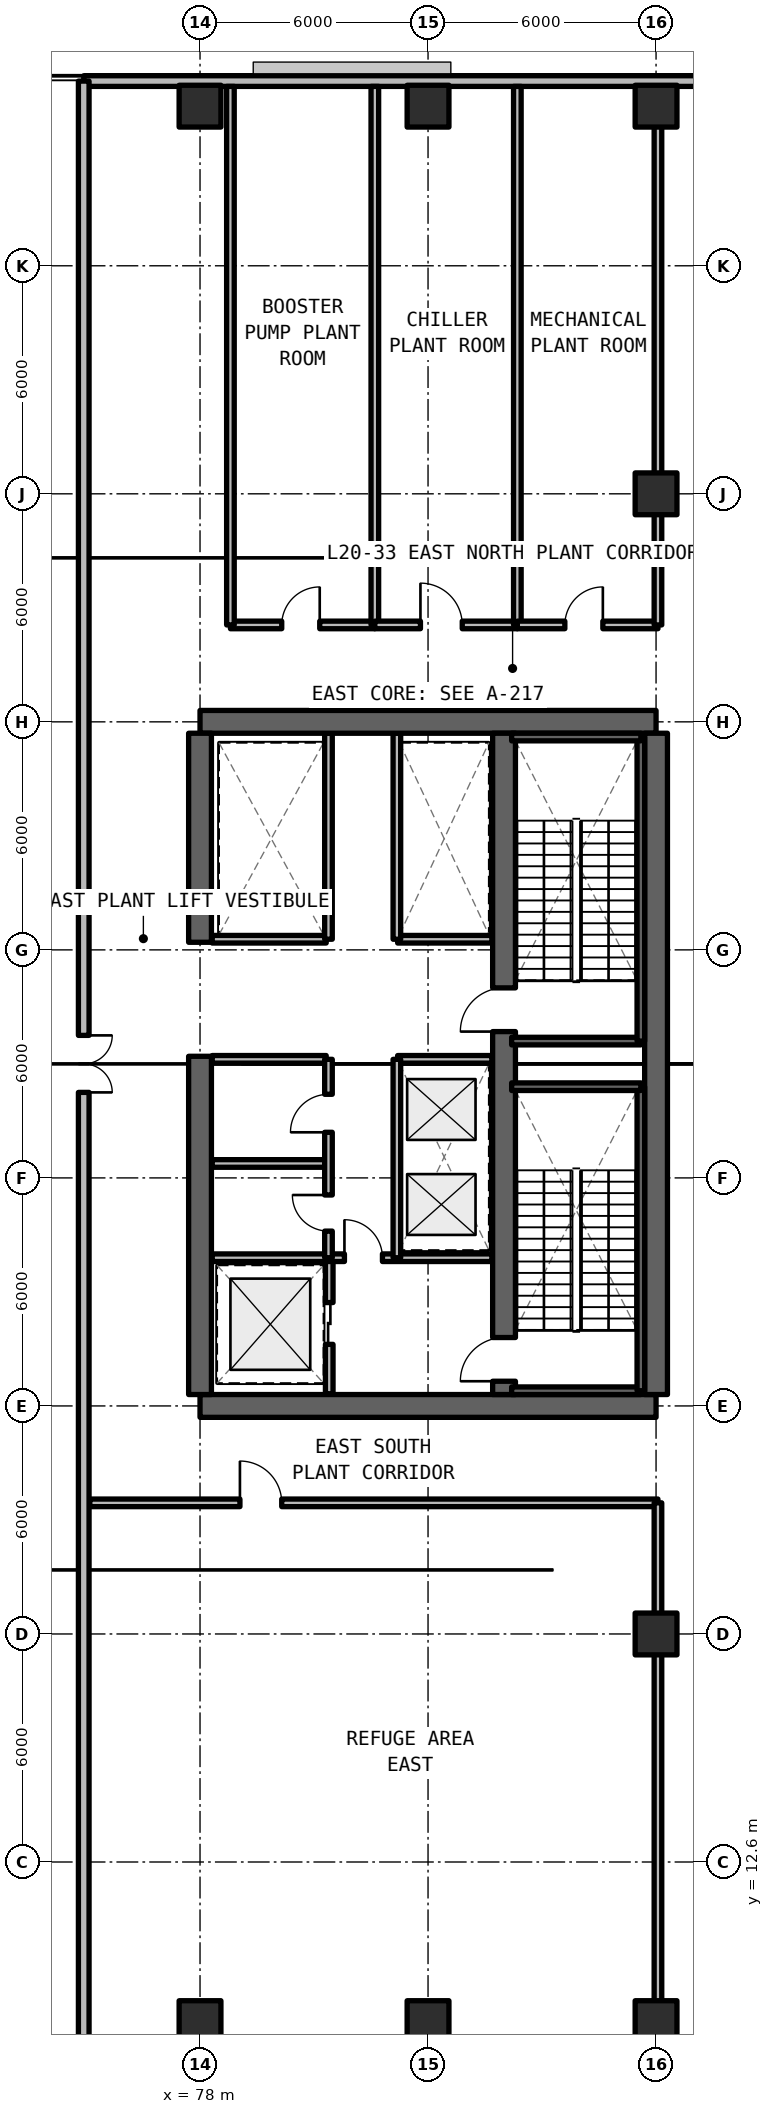
"""IFC4 building model, lengths in metres.
Left out: names, types, materials, properties, quantities, classifications, styles, units other than length and angle.
Written with IfcOpenShell. Run it as: python <this file> out.ifc"""

import sys

from ifc_helpers import new_model, si_unit, direction, frame, frame_2d, origin, origin_2d, place, context, subcontext, project, spatial, rectangle, extrude, element, fill, save


model = new_model("IFC4")
c1 = context("Model", 3, precision=1e-05, world=origin(), true_north=direction((0.0, 1.0)))
c2 = subcontext(c1, "Body", "Model", "MODEL_VIEW")
j1 = project(units=[si_unit("LENGTHUNIT", "METRE"), si_unit("PLANEANGLEUNIT", "RADIAN")], contexts=[c1])
p1 = place(None, origin())
s1 = spatial("IfcSite", under=j1, at=p1, CompositionType="ELEMENT")
p2 = place(p1, origin())
s2 = spatial("IfcBuilding", under=s1, at=p2, CompositionType="ELEMENT")
p3 = place(p2, frame((0.0, 0.0, 73.26)))
s3 = spatial("IfcBuildingStorey", under=s2, at=p3, CompositionType="ELEMENT", Elevation=73.26)
for number, where, z_axis, x_axis in (
    (1, (78.0, 24.6, 0.0), (0.0, 0.0, 1.0), (1.0, 0.0, 0.0)),
    (2, (90.0, 42.6, 0.0), (0.0, 0.0, 1.0), (-1.0, 0.0, 0.0)),
):
    element("IfcWall", number, at=place(p3, frame(where, z_axis=z_axis, x_axis=x_axis)), inside=s3, PredefinedType="SHEAR", context=c2, shape_type="SweptSolid", body=[
        extrude(rectangle(XDim=12.0, YDim=0.6, at=frame_2d((6.0, 0.0))), origin(), (0.0, 0.0, 1.0), 4.95),
    ])
p4 = place(p3, frame((90.0, 24.9, 0.0), z_axis=(0.0, 0.0, 1.0), x_axis=(0.0, 1.0, 0.0)))
e3 = element("IfcWall", 3, at=p4, inside=s3, PredefinedType="SHEAR", context=c2, shape_type="SweptSolid", body=[
    extrude(rectangle(XDim=17.4, YDim=0.6, at=frame_2d((8.7, 0.0))), origin(), (0.0, 0.0, 1.0), 4.95),
])
p5 = place(p3, frame((78.0, 24.9, 0.0), z_axis=(0.0, 0.0, 1.0), x_axis=(0.0, 1.0, 0.0)))
e4 = element("IfcWall", 4, at=p5, inside=s3, PredefinedType="SHEAR", context=c2, shape_type="SweptSolid", body=[
    extrude(rectangle(XDim=8.9, YDim=0.6, at=frame_2d((4.45, 0.0))), origin(), (0.0, 0.0, 1.0), 4.95),
])
p6 = place(p3, frame((78.0, 36.8, 0.0), z_axis=(0.0, 0.0, 1.0), x_axis=(0.0, 1.0, 0.0)))
e5 = element("IfcWall", 5, at=p6, inside=s3, PredefinedType="SHEAR", context=c2, shape_type="SweptSolid", body=[
    extrude(rectangle(XDim=5.5, YDim=0.6, at=frame_2d((2.75, 0.0))), origin(), (0.0, 0.0, 1.0), 4.95),
])
p7 = place(p3, frame((86.0, 24.9, 0.0), z_axis=(0.0, 0.0, 1.0), x_axis=(0.0, 1.0, 0.0)))
e6 = element("IfcWall", 6, at=p7, inside=s3, PredefinedType="SHEAR", context=c2, shape_type="SweptSolid", body=[
    extrude(rectangle(XDim=17.4, YDim=0.6, at=frame_2d((8.7, 0.0))), origin(), (0.0, 0.0, 1.0), 4.95),
])
p8 = place(p7, frame((0.35, 0.0, 0.0)))
e7 = element("IfcOpeningElement", 7, at=p8, cuts=e6, PredefinedType="OPENING", context=c2, shape_type="SweptSolid", body=[
    extrude(rectangle(XDim=1.15, YDim=2.15, at=frame_2d((0.575, 1.075))), frame((0.0, 0.31, 0.0), z_axis=(0.0, -1.0, 0.0), x_axis=(1.0, 0.0, 0.0)), (0.0, 0.0, 1.0), 0.62),
])
p9 = place(p7, frame((9.55, 0.0, 0.0)))
e8 = element("IfcOpeningElement", 8, at=p9, cuts=e6, PredefinedType="OPENING", context=c2, shape_type="SweptSolid", body=[
    extrude(rectangle(XDim=1.15, YDim=2.15, at=frame_2d((0.575, 1.075))), frame((0.0, 0.31, 0.0), z_axis=(0.0, -1.0, 0.0), x_axis=(1.0, 0.0, 0.0)), (0.0, 0.0, 1.0), 0.62),
])
for number, where, z_axis, x_axis in (
    (9, (90.0, 18.6, 0.0), (0.0, 0.0, 1.0), (1.0, 0.0, 0.0)),
    (10, (90.0, 48.6, 0.0), (0.0, 0.0, 1.0), (1.0, 0.0, 0.0)),
):
    element("IfcColumn", number, at=place(p3, frame(where, z_axis=z_axis, x_axis=x_axis)), inside=s3, PredefinedType="COLUMN", context=c2, shape_type="SweptSolid", body=[
        extrude(rectangle(XDim=1.1, YDim=1.1, at=origin_2d()), origin(), (0.0, 0.0, 1.0), 4.95),
    ])
for number, where, z_axis, x_axis in (
    (11, (78.0, 8.4, 0.0), (0.0, 0.0, 1.0), (1.0, 0.0, 0.0)),
    (12, (78.0, 58.8, 0.0), (0.0, 0.0, 1.0), (1.0, 0.0, 0.0)),
    (13, (84.0, 8.4, 0.0), (0.0, 0.0, 1.0), (1.0, 0.0, 0.0)),
    (14, (84.0, 58.8, 0.0), (0.0, 0.0, 1.0), (1.0, 0.0, 0.0)),
    (15, (90.0, 8.4, 0.0), (0.0, 0.0, 1.0), (1.0, 0.0, 0.0)),
    (16, (90.0, 58.8, 0.0), (0.0, 0.0, 1.0), (1.0, 0.0, 0.0)),
):
    element("IfcColumn", number, at=place(p3, frame(where, z_axis=z_axis, x_axis=x_axis)), inside=s3, PredefinedType="COLUMN", context=c2, shape_type="SweptSolid", body=[
        extrude(rectangle(XDim=1.1, YDim=1.1, at=origin_2d()), origin(), (0.0, 0.0, 1.0), 4.67),
    ])
p10 = place(p3, frame((96.542, 59.46, 0.0), z_axis=(0.0, 0.0, 1.0), x_axis=(-1.0, 0.0, 0.0)))
e17 = element("IfcWall", 17, at=p10, inside=s3, PredefinedType="SOLIDWALL", context=c2, shape_type="SweptSolid", body=[
    extrude(rectangle(XDim=21.602, YDim=0.28, at=frame_2d((10.801, 0.0))), origin(), (0.0, 0.0, 1.0), 4.67),
])
p11 = place(p3, frame((74.94, 59.46, 0.0), z_axis=(0.0, 0.0, 1.0), x_axis=(0.0, -1.0, 0.0)))
e18 = element("IfcWall", 18, at=p11, inside=s3, PredefinedType="SOLIDWALL", context=c2, shape_type="SweptSolid", body=[
    extrude(rectangle(XDim=51.72, YDim=0.28, at=frame_2d((25.86, 0.0))), origin(), (0.0, 0.0, 1.0), 4.246),
])
p12 = place(p11, frame((25.11, 0.0, 0.0)))
e19 = element("IfcOpeningElement", 19, at=p12, cuts=e18, PredefinedType="OPENING", context=c2, shape_type="SweptSolid", body=[
    extrude(rectangle(XDim=1.5, YDim=2.2, at=frame_2d((0.75, 1.1))), frame((0.0, 0.15, 0.0), z_axis=(0.0, -1.0, 0.0), x_axis=(1.0, 0.0, 0.0)), (0.0, 0.0, 1.0), 0.3),
])
p13 = place(p3, frame((81.4, 24.92, 0.0), z_axis=(0.0, 0.0, 1.0), x_axis=(0.0, 1.0, 0.0)))
e20 = element("IfcWall", 20, at=p13, inside=s3, PredefinedType="SOLIDWALL", context=c2, shape_type="SweptSolid", body=[
    extrude(rectangle(XDim=3.58, YDim=0.2, at=frame_2d((1.79, 0.0))), origin(), (0.0, 0.0, 1.0), 3.89),
])
p14 = place(p13, frame((1.3, 0.0, 0.0)))
e21 = element("IfcOpeningElement", 21, at=p14, cuts=e20, PredefinedType="OPENING", context=c2, shape_type="SweptSolid", body=[
    extrude(rectangle(XDim=1.1, YDim=2.2, at=frame_2d((0.55, 1.1))), frame((0.0, 0.11, 0.0), z_axis=(0.0, -1.0, 0.0), x_axis=(1.0, 0.0, 0.0)), (0.0, 0.0, 1.0), 0.22),
])
p15 = place(p3, frame((78.32, 28.5, 0.0), z_axis=(0.0, 0.0, 1.0), x_axis=(1.0, 0.0, 0.0)))
e22 = element("IfcWall", 22, at=p15, inside=s3, PredefinedType="SOLIDWALL", context=c2, shape_type="SweptSolid", body=[
    extrude(rectangle(XDim=7.36, YDim=0.2, at=frame_2d((3.68, 0.0))), origin(), (0.0, 0.0, 1.0), 3.89),
])
p16 = place(p15, frame((3.48, 0.0, 0.0)))
e23 = element("IfcOpeningElement", 23, at=p16, cuts=e22, PredefinedType="OPENING", context=c2, shape_type="SweptSolid", body=[
    extrude(rectangle(XDim=1.0, YDim=2.15, at=frame_2d((0.5, 1.075))), frame((0.0, 0.11, 0.0), z_axis=(0.0, -1.0, 0.0), x_axis=(1.0, 0.0, 0.0)), (0.0, 0.0, 1.0), 0.22),
])
p17 = place(p3, frame((83.2, 33.72, 0.0), z_axis=(0.0, 0.0, 1.0), x_axis=(1.0, 0.0, 0.0)))
e24 = element("IfcWall", 24, at=p17, inside=s3, PredefinedType="SOLIDWALL", context=c2, shape_type="SweptSolid", body=[
    extrude(rectangle(XDim=2.48, YDim=0.2, at=frame_2d((1.24, 0.0))), origin(), (0.0, 0.0, 1.0), 3.89),
])
p18 = place(p3, frame((83.18, 28.5, 0.0), z_axis=(0.0, 0.0, 1.0), x_axis=(0.0, 1.0, 0.0)))
e25 = element("IfcWall", 25, at=p18, inside=s3, PredefinedType="SOLIDWALL", context=c2, shape_type="SweptSolid", body=[
    extrude(rectangle(XDim=5.22, YDim=0.2, at=frame_2d((2.61, 0.0))), origin(), (0.0, 0.0, 1.0), 3.89),
])
for number, where, z_axis, x_axis in (
    (26, (78.32, 30.98, 0.0), (0.0, 0.0, 1.0), (1.0, 0.0, 0.0)),
    (27, (78.32, 33.72, 0.0), (0.0, 0.0, 1.0), (1.0, 0.0, 0.0)),
):
    element("IfcWall", number, at=place(p3, frame(where, z_axis=z_axis, x_axis=x_axis)), inside=s3, PredefinedType="SOLIDWALL", context=c2, shape_type="SweptSolid", body=[
        extrude(rectangle(XDim=3.0, YDim=0.2, at=frame_2d((1.5, 0.0))), origin(), (0.0, 0.0, 1.0), 3.89),
    ])
p19 = place(p3, frame((81.38, 28.5, 0.0), z_axis=(0.0, 0.0, 1.0), x_axis=(0.0, 1.0, 0.0)))
e28 = element("IfcWall", 28, at=p19, inside=s3, PredefinedType="SOLIDWALL", context=c2, shape_type="SweptSolid", body=[
    extrude(rectangle(XDim=5.22, YDim=0.2, at=frame_2d((2.61, 0.0))), origin(), (0.0, 0.0, 1.0), 3.89),
])
p20 = place(p19, frame((0.7, 0.0, 0.0)))
e29 = element("IfcOpeningElement", 29, at=p20, cuts=e28, PredefinedType="OPENING", context=c2, shape_type="SweptSolid", body=[
    extrude(rectangle(XDim=0.95, YDim=2.15, at=frame_2d((0.475, 1.075))), frame((0.0, 0.11, 0.0), z_axis=(0.0, -1.0, 0.0), x_axis=(1.0, 0.0, 0.0)), (0.0, 0.0, 1.0), 0.22),
])
p21 = place(p19, frame((3.3, 0.0, 0.0)))
e30 = element("IfcOpeningElement", 30, at=p21, cuts=e28, PredefinedType="OPENING", context=c2, shape_type="SweptSolid", body=[
    extrude(rectangle(XDim=1.0, YDim=2.15, at=frame_2d((0.5, 1.075))), frame((0.0, 0.11, 0.0), z_axis=(0.0, -1.0, 0.0), x_axis=(1.0, 0.0, 0.0)), (0.0, 0.0, 1.0), 0.22),
])
p22 = place(p3, frame((83.2, 36.88, 0.0), z_axis=(0.0, 0.0, 1.0), x_axis=(1.0, 0.0, 0.0)))
e31 = element("IfcWall", 31, at=p22, inside=s3, PredefinedType="SOLIDWALL", context=c2, shape_type="SweptSolid", body=[
    extrude(rectangle(XDim=2.48, YDim=0.2, at=frame_2d((1.24, 0.0))), origin(), (0.0, 0.0, 1.0), 3.89),
])
p23 = place(p3, frame((83.18, 36.88, 0.0), z_axis=(0.0, 0.0, 1.0), x_axis=(0.0, 1.0, 0.0)))
e32 = element("IfcWall", 32, at=p23, inside=s3, PredefinedType="SOLIDWALL", context=c2, shape_type="SweptSolid", body=[
    extrude(rectangle(XDim=5.42, YDim=0.2, at=frame_2d((2.71, 0.0))), origin(), (0.0, 0.0, 1.0), 3.89),
])
p24 = place(p3, frame((78.32, 36.88, 0.0), z_axis=(0.0, 0.0, 1.0), x_axis=(1.0, 0.0, 0.0)))
e33 = element("IfcWall", 33, at=p24, inside=s3, PredefinedType="SOLIDWALL", context=c2, shape_type="SweptSolid", body=[
    extrude(rectangle(XDim=3.0, YDim=0.2, at=frame_2d((1.5, 0.0))), origin(), (0.0, 0.0, 1.0), 3.89),
])
p25 = place(p3, frame((81.38, 36.88, 0.0), z_axis=(0.0, 0.0, 1.0), x_axis=(0.0, 1.0, 0.0)))
e34 = element("IfcWall", 34, at=p25, inside=s3, PredefinedType="SOLIDWALL", context=c2, shape_type="SweptSolid", body=[
    extrude(rectangle(XDim=5.42, YDim=0.2, at=frame_2d((2.71, 0.0))), origin(), (0.0, 0.0, 1.0), 3.89),
])
p26 = place(p3, frame((75.1, 22.05, 0.0), z_axis=(0.0, 0.0, 1.0), x_axis=(1.0, 0.0, 0.0)))
e35 = element("IfcWall", 35, at=p26, inside=s3, PredefinedType="SOLIDWALL", context=c2, shape_type="SweptSolid", body=[
    extrude(rectangle(XDim=14.95, YDim=0.2, at=frame_2d((7.475, 0.0))), origin(), (0.0, 0.0, 1.0), 3.89),
])
p27 = place(p26, frame((3.95, 0.0, 0.0)))
e36 = element("IfcOpeningElement", 36, at=p27, cuts=e35, PredefinedType="OPENING", context=c2, shape_type="SweptSolid", body=[
    extrude(rectangle(XDim=1.1, YDim=2.15, at=frame_2d((0.55, 1.075))), frame((0.0, 0.11, 0.0), z_axis=(0.0, -1.0, 0.0), x_axis=(1.0, 0.0, 0.0)), (0.0, 0.0, 1.0), 0.22),
])
p28 = place(p3, frame((90.05, 7.88, 0.0), z_axis=(0.0, 0.0, 1.0), x_axis=(0.0, 1.0, 0.0)))
e37 = element("IfcWall", 37, at=p28, inside=s3, PredefinedType="SOLIDWALL", context=c2, shape_type="SweptSolid", body=[
    extrude(rectangle(XDim=14.17, YDim=0.2, at=frame_2d((7.085, 0.0))), origin(), (0.0, 0.0, 1.0), 3.647),
])
p29 = place(p3, frame((78.8, 45.15, 0.0), z_axis=(0.0, 0.0, 1.0), x_axis=(1.0, 0.0, 0.0)))
e38 = element("IfcWall", 38, at=p29, inside=s3, PredefinedType="SOLIDWALL", context=c2, shape_type="SweptSolid", body=[
    extrude(rectangle(XDim=3.8, YDim=0.2, at=frame_2d((1.9, 0.0))), origin(), (0.0, 0.0, 1.0), 3.89),
])
p30 = place(p29, frame((1.35, 0.0, 0.0)))
e39 = element("IfcOpeningElement", 39, at=p30, cuts=e38, PredefinedType="OPENING", context=c2, shape_type="SweptSolid", body=[
    extrude(rectangle(XDim=1.0, YDim=2.15, at=frame_2d((0.5, 1.075))), frame((0.0, 0.11, 0.0), z_axis=(0.0, -1.0, 0.0), x_axis=(1.0, 0.0, 0.0)), (0.0, 0.0, 1.0), 0.22),
])
for number, where, z_axis, x_axis in (
    (40, (78.8, 45.15, 0.0), (0.0, 0.0, 1.0), (0.0, 1.0, 0.0)),
    (41, (82.6, 45.15, 0.0), (0.0, 0.0, 1.0), (0.0, 1.0, 0.0)),
):
    element("IfcWall", number, at=place(p3, frame(where, z_axis=z_axis, x_axis=x_axis)), inside=s3, PredefinedType="SOLIDWALL", context=c2, shape_type="SweptSolid", body=[
        extrude(rectangle(XDim=14.17, YDim=0.2, at=frame_2d((7.085, 0.0))), origin(), (0.0, 0.0, 1.0), 3.89),
    ])
p31 = place(p3, frame((82.6, 45.15, 0.0), z_axis=(0.0, 0.0, 1.0), x_axis=(1.0, 0.0, 0.0)))
e42 = element("IfcWall", 42, at=p31, inside=s3, PredefinedType="SOLIDWALL", context=c2, shape_type="SweptSolid", body=[
    extrude(rectangle(XDim=3.75, YDim=0.2, at=frame_2d((1.875, 0.0))), origin(), (0.0, 0.0, 1.0), 3.89),
])
p32 = place(p31, frame((1.2, 0.0, 0.0)))
e43 = element("IfcOpeningElement", 43, at=p32, cuts=e42, PredefinedType="OPENING", context=c2, shape_type="SweptSolid", body=[
    extrude(rectangle(XDim=1.1, YDim=2.15, at=frame_2d((0.55, 1.075))), frame((0.0, 0.11, 0.0), z_axis=(0.0, -1.0, 0.0), x_axis=(1.0, 0.0, 0.0)), (0.0, 0.0, 1.0), 0.22),
])
p33 = place(p3, frame((86.35, 45.15, 0.0), z_axis=(0.0, 0.0, 1.0), x_axis=(0.0, 1.0, 0.0)))
e44 = element("IfcWall", 44, at=p33, inside=s3, PredefinedType="SOLIDWALL", context=c2, shape_type="SweptSolid", body=[
    extrude(rectangle(XDim=14.17, YDim=0.2, at=frame_2d((7.085, 0.0))), origin(), (0.0, 0.0, 1.0), 3.89),
])
p34 = place(p3, frame((86.35, 45.15, 0.0), z_axis=(0.0, 0.0, 1.0), x_axis=(1.0, 0.0, 0.0)))
e45 = element("IfcWall", 45, at=p34, inside=s3, PredefinedType="SOLIDWALL", context=c2, shape_type="SweptSolid", body=[
    extrude(rectangle(XDim=3.7, YDim=0.2, at=frame_2d((1.85, 0.0))), origin(), (0.0, 0.0, 1.0), 3.89),
])
p35 = place(p34, frame((1.25, 0.0, 0.0)))
e46 = element("IfcOpeningElement", 46, at=p35, cuts=e45, PredefinedType="OPENING", context=c2, shape_type="SweptSolid", body=[
    extrude(rectangle(XDim=1.0, YDim=2.15, at=frame_2d((0.5, 1.075))), frame((0.0, 0.11, 0.0), z_axis=(0.0, -1.0, 0.0), x_axis=(1.0, 0.0, 0.0)), (0.0, 0.0, 1.0), 0.22),
])
p36 = place(p3, frame((90.05, 45.15, 0.0), z_axis=(0.0, 0.0, 1.0), x_axis=(0.0, 1.0, 0.0)))
e47 = element("IfcWall", 47, at=p36, inside=s3, PredefinedType="SOLIDWALL", context=c2, shape_type="SweptSolid", body=[
    extrude(rectangle(XDim=14.17, YDim=0.2, at=frame_2d((7.085, 0.0))), origin(), (0.0, 0.0, 1.0), 3.647),
])
p37 = place(p3, frame((86.2, 25.0, 0.0), z_axis=(0.0, 0.0, 1.0), x_axis=(1.0, 0.0, 0.0)))
e48 = element("IfcWall", 48, at=p37, inside=s3, PredefinedType="SOLIDWALL", context=c2, shape_type="SweptSolid", body=[
    extrude(rectangle(XDim=3.4, YDim=0.2, at=frame_2d((1.7, 0.0))), origin(), (0.0, 0.0, 1.0), 4.95),
])
p38 = place(p3, frame((89.6, 25.0, 0.0), z_axis=(0.0, 0.0, 1.0), x_axis=(0.0, 1.0, 0.0)))
e49 = element("IfcWall", 49, at=p38, inside=s3, PredefinedType="SOLIDWALL", context=c2, shape_type="SweptSolid", body=[
    extrude(rectangle(XDim=8.0, YDim=0.2, at=frame_2d((4.0, 0.0))), origin(), (0.0, 0.0, 1.0), 4.95),
])
for number, where, z_axis, x_axis in (
    (50, (89.6, 33.0, 0.0), (0.0, 0.0, 1.0), (-1.0, 0.0, 0.0)),
    (51, (86.2, 34.2, 0.0), (0.0, 0.0, 1.0), (1.0, 0.0, 0.0)),
):
    element("IfcWall", number, at=place(p3, frame(where, z_axis=z_axis, x_axis=x_axis)), inside=s3, PredefinedType="SOLIDWALL", context=c2, shape_type="SweptSolid", body=[
        extrude(rectangle(XDim=3.4, YDim=0.2, at=frame_2d((1.7, 0.0))), origin(), (0.0, 0.0, 1.0), 4.95),
    ])
p39 = place(p3, frame((89.6, 34.2, 0.0), z_axis=(0.0, 0.0, 1.0), x_axis=(0.0, 1.0, 0.0)))
e52 = element("IfcWall", 52, at=p39, inside=s3, PredefinedType="SOLIDWALL", context=c2, shape_type="SweptSolid", body=[
    extrude(rectangle(XDim=8.0, YDim=0.2, at=frame_2d((4.0, 0.0))), origin(), (0.0, 0.0, 1.0), 4.95),
])
p40 = place(p3, frame((89.6, 42.2, 0.0), z_axis=(0.0, 0.0, 1.0), x_axis=(-1.0, 0.0, 0.0)))
e53 = element("IfcWall", 53, at=p40, inside=s3, PredefinedType="SOLIDWALL", context=c2, shape_type="SweptSolid", body=[
    extrude(rectangle(XDim=3.4, YDim=0.2, at=frame_2d((1.7, 0.0))), origin(), (0.0, 0.0, 1.0), 4.95),
])
p41 = place(p12, origin())
e54 = element("IfcDoor", 54, at=p41, inside=s3, OperationType="SINGLE_SWING_LEFT", PredefinedType="DOOR", context=c2, shape_type="SweptSolid", body=[
    extrude(rectangle(XDim=1.5, YDim=2.2, at=frame_2d((0.75, 1.1))), frame((0.0, 0.025, 0.0), z_axis=(0.0, -1.0, 0.0), x_axis=(1.0, 0.0, 0.0)), (0.0, 0.0, 1.0), 0.05),
])
fill(e19, e54)
p42 = place(p14, origin())
e55 = element("IfcDoor", 55, at=p42, inside=s3, OperationType="SLIDING_TO_LEFT", PredefinedType="DOOR", context=c2, shape_type="SweptSolid", body=[
    extrude(rectangle(XDim=1.1, YDim=2.2, at=frame_2d((0.55, 1.1))), frame((0.0, 0.025, 0.0), z_axis=(0.0, -1.0, 0.0), x_axis=(1.0, 0.0, 0.0)), (0.0, 0.0, 1.0), 0.05),
])
fill(e21, e55)
p43 = place(p16, origin())
e56 = element("IfcDoor", 56, at=p43, inside=s3, OperationType="SINGLE_SWING_LEFT", PredefinedType="DOOR", context=c2, shape_type="SweptSolid", body=[
    extrude(rectangle(XDim=1.0, YDim=2.15, at=frame_2d((0.5, 1.075))), frame((0.0, 0.025, 0.0), z_axis=(0.0, -1.0, 0.0), x_axis=(1.0, 0.0, 0.0)), (0.0, 0.0, 1.0), 0.05),
])
fill(e23, e56)
p44 = place(p20, origin())
e57 = element("IfcDoor", 57, at=p44, inside=s3, OperationType="SINGLE_SWING_RIGHT", PredefinedType="DOOR", context=c2, shape_type="SweptSolid", body=[
    extrude(rectangle(XDim=0.95, YDim=2.15, at=frame_2d((0.475, 1.075))), frame((0.0, 0.025, 0.0), z_axis=(0.0, -1.0, 0.0), x_axis=(1.0, 0.0, 0.0)), (0.0, 0.0, 1.0), 0.05),
])
fill(e29, e57)
p45 = place(p21, origin())
e58 = element("IfcDoor", 58, at=p45, inside=s3, OperationType="SINGLE_SWING_LEFT", PredefinedType="DOOR", context=c2, shape_type="SweptSolid", body=[
    extrude(rectangle(XDim=1.0, YDim=2.15, at=frame_2d((0.5, 1.075))), frame((0.0, 0.025, 0.0), z_axis=(0.0, -1.0, 0.0), x_axis=(1.0, 0.0, 0.0)), (0.0, 0.0, 1.0), 0.05),
])
fill(e30, e58)
p46 = place(p27, origin())
e59 = element("IfcDoor", 59, at=p46, inside=s3, OperationType="SINGLE_SWING_LEFT", PredefinedType="DOOR", context=c2, shape_type="SweptSolid", body=[
    extrude(rectangle(XDim=1.1, YDim=2.15, at=frame_2d((0.55, 1.075))), frame((0.0, 0.025, 0.0), z_axis=(0.0, -1.0, 0.0), x_axis=(1.0, 0.0, 0.0)), (0.0, 0.0, 1.0), 0.05),
])
fill(e36, e59)
p47 = place(p30, origin())
e60 = element("IfcDoor", 60, at=p47, inside=s3, OperationType="SINGLE_SWING_RIGHT", PredefinedType="DOOR", context=c2, shape_type="SweptSolid", body=[
    extrude(rectangle(XDim=1.0, YDim=2.15, at=frame_2d((0.5, 1.075))), frame((0.0, 0.025, 0.0), z_axis=(0.0, -1.0, 0.0), x_axis=(1.0, 0.0, 0.0)), (0.0, 0.0, 1.0), 0.05),
])
fill(e39, e60)
p48 = place(p32, origin())
e61 = element("IfcDoor", 61, at=p48, inside=s3, OperationType="SINGLE_SWING_LEFT", PredefinedType="DOOR", context=c2, shape_type="SweptSolid", body=[
    extrude(rectangle(XDim=1.1, YDim=2.15, at=frame_2d((0.55, 1.075))), frame((0.0, 0.025, 0.0), z_axis=(0.0, -1.0, 0.0), x_axis=(1.0, 0.0, 0.0)), (0.0, 0.0, 1.0), 0.05),
])
fill(e43, e61)
p49 = place(p35, origin())
e62 = element("IfcDoor", 62, at=p49, inside=s3, OperationType="SINGLE_SWING_RIGHT", PredefinedType="DOOR", context=c2, shape_type="SweptSolid", body=[
    extrude(rectangle(XDim=1.0, YDim=2.15, at=frame_2d((0.5, 1.075))), frame((0.0, 0.025, 0.0), z_axis=(0.0, -1.0, 0.0), x_axis=(1.0, 0.0, 0.0)), (0.0, 0.0, 1.0), 0.05),
])
fill(e46, e62)
p50 = place(p8, origin())
e63 = element("IfcDoor", 63, at=p50, inside=s3, OperationType="SINGLE_SWING_LEFT", PredefinedType="DOOR", context=c2, shape_type="SweptSolid", body=[
    extrude(rectangle(XDim=1.15, YDim=2.15, at=frame_2d((0.575, 1.075))), frame((0.0, 0.025, 0.0), z_axis=(0.0, -1.0, 0.0), x_axis=(1.0, 0.0, 0.0)), (0.0, 0.0, 1.0), 0.05),
])
fill(e7, e63)
p51 = place(p9, origin())
e64 = element("IfcDoor", 64, at=p51, inside=s3, OperationType="SINGLE_SWING_RIGHT", PredefinedType="DOOR", context=c2, shape_type="SweptSolid", body=[
    extrude(rectangle(XDim=1.15, YDim=2.15, at=frame_2d((0.575, 1.075))), frame((0.0, 0.025, 0.0), z_axis=(0.0, -1.0, 0.0), x_axis=(1.0, 0.0, 0.0)), (0.0, 0.0, 1.0), 0.05),
])
fill(e8, e64)
save(model, sys.argv[1])
